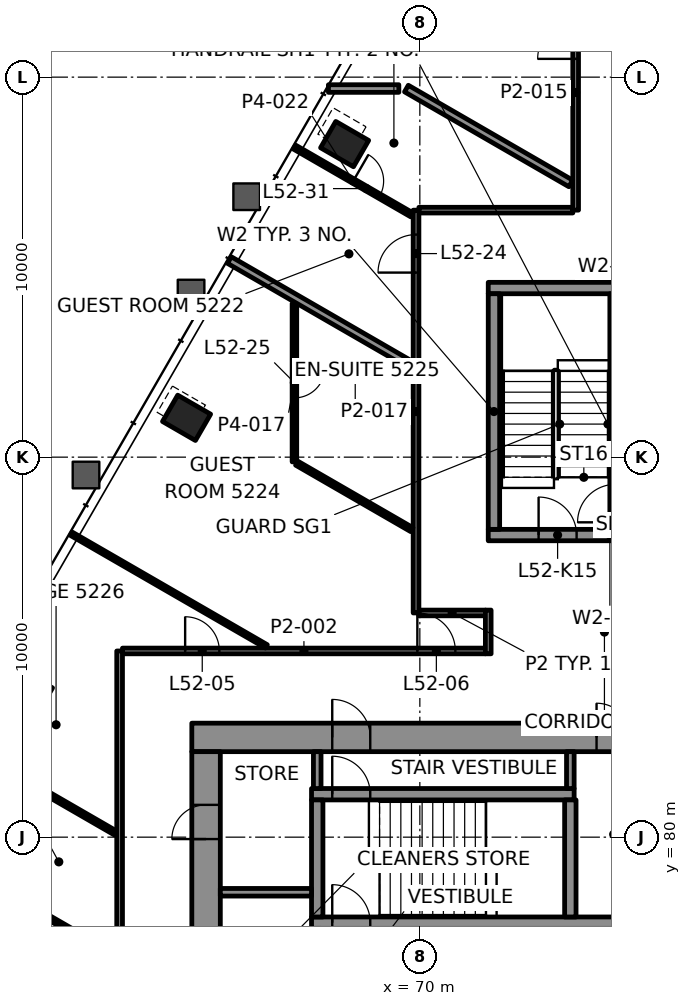
"""IFC4 building model, lengths in metres.
Left out: names, types, materials, properties, quantities, classifications, styles, units other than length and angle.
Written with IfcOpenShell. Run it as: python <this file> out.ifc"""

import sys

from ifc_helpers import new_model, si_unit, direction, frame, frame_2d, origin, origin_2d, place, context, subcontext, project, spatial, rectangle, hollow_rectangle, extrude, element, fill, save


model = new_model("IFC4")
c1 = context("Model", 3, precision=1e-05, world=origin(), true_north=direction((0.0, 1.0)))
c2 = subcontext(c1, "Body", "Model", "MODEL_VIEW")
j1 = project(units=[si_unit("LENGTHUNIT", "METRE"), si_unit("PLANEANGLEUNIT", "RADIAN")], contexts=[c1])
p1 = place(None, origin())
s1 = spatial("IfcSite", under=j1, at=p1, CompositionType="ELEMENT")
p2 = place(p1, origin())
s2 = spatial("IfcBuilding", under=s1, at=p2, CompositionType="ELEMENT")
p3 = place(p2, frame((0.0, 0.0, 222.1)))
s3 = spatial("IfcBuildingStorey", under=s2, at=p3, CompositionType="ELEMENT", Elevation=222.1)
for number, where, z_axis, x_axis in (
    (1, (68.021, 98.238, -0.0), (0.0, 0.0, 1.0), (-0.5, -0.866, 0.0)),
    (2, (63.862, 91.035, -0.0), (0.0, 0.0, 1.0), (-0.5, -0.866, 0.0)),
    (3, (59.703, 83.832, -0.0), (0.0, 0.0, 1.0), (-0.5, -0.866, 0.0)),
):
    element("IfcColumn", number, at=place(p3, frame(where, z_axis=z_axis, x_axis=x_axis)), inside=s3, PredefinedType="COLUMN", context=c2, shape_type="SweptSolid", body=[
        extrude(hollow_rectangle(XDim=0.8, YDim=1.0, WallThickness=0.05, at=origin_2d()), origin(), (0.0, 0.0, 1.0), 3.9),
    ])
p4 = place(p3, frame((64.0, 82.625, 0.0), z_axis=(0.0, 0.0, 1.0), x_axis=(1.0, 0.0, 0.0)))
e4 = element("IfcWall", 4, at=p4, inside=s3, PredefinedType="SHEAR", context=c2, shape_type="SweptSolid", body=[
    extrude(rectangle(XDim=22.0, YDim=0.75, at=frame_2d((11.0, 0.0))), origin(), (0.0, 0.0, 1.0), 3.7),
])
p5 = place(p4, frame((3.695, 0.0, 0.0)))
e5 = element("IfcOpeningElement", 5, at=p5, cuts=e4, PredefinedType="OPENING", context=c2, shape_type="SweptSolid", body=[
    extrude(rectangle(XDim=1.0, YDim=2.1, at=frame_2d((0.5, 1.05))), frame((0.0, 0.385, 0.0), z_axis=(0.0, -1.0, 0.0), x_axis=(1.0, 0.0, 0.0)), (0.0, 0.0, 1.0), 0.77),
])
p6 = place(p4, frame((17.505, 0.0, 0.0)))
e6 = element("IfcOpeningElement", 6, at=p6, cuts=e4, PredefinedType="OPENING", context=c2, shape_type="SweptSolid", body=[
    extrude(rectangle(XDim=1.0, YDim=2.1, at=frame_2d((0.5, 1.05))), frame((0.0, 0.385, 0.0), z_axis=(0.0, -1.0, 0.0), x_axis=(1.0, 0.0, 0.0)), (0.0, 0.0, 1.0), 0.77),
])
p7 = place(p4, frame((10.65, 0.0, 0.0)))
e7 = element("IfcOpeningElement", 7, at=p7, cuts=e4, PredefinedType="OPENING", context=c2, shape_type="SweptSolid", body=[
    extrude(rectangle(XDim=0.9, YDim=2.1, at=frame_2d((0.45, 1.05))), frame((0.0, 0.385, 0.0), z_axis=(0.0, -1.0, 0.0), x_axis=(1.0, 0.0, 0.0)), (0.0, 0.0, 1.0), 0.77),
])
p8 = place(p3, frame((64.375, 67.75, 0.0), z_axis=(0.0, 0.0, 1.0), x_axis=(0.0, 1.0, 0.0)))
e8 = element("IfcWall", 8, at=p8, inside=s3, PredefinedType="SHEAR", context=c2, shape_type="SweptSolid", body=[
    extrude(rectangle(XDim=14.5, YDim=0.75, at=frame_2d((7.25, 0.0))), origin(), (0.0, 0.0, 1.0), 3.7),
])
p9 = place(p8, frame((4.65, 0.0, 0.0)))
e9 = element("IfcOpeningElement", 9, at=p9, cuts=e8, PredefinedType="OPENING", context=c2, shape_type="SweptSolid", body=[
    extrude(rectangle(XDim=1.8, YDim=2.1, at=frame_2d((0.9, 1.05))), frame((0.0, 0.385, 0.0), z_axis=(0.0, -1.0, 0.0), x_axis=(1.0, 0.0, 0.0)), (0.0, 0.0, 1.0), 0.77),
])
p10 = place(p8, frame((8.5, 0.0, 0.0)))
e10 = element("IfcOpeningElement", 10, at=p10, cuts=e8, PredefinedType="OPENING", context=c2, shape_type="SweptSolid", body=[
    extrude(rectangle(XDim=0.9, YDim=2.1, at=frame_2d((0.45, 1.05))), frame((0.0, 0.385, 0.0), z_axis=(0.0, -1.0, 0.0), x_axis=(1.0, 0.0, 0.0)), (0.0, 0.0, 1.0), 0.77),
])
p11 = place(p8, frame((12.2, 0.0, 0.0)))
e11 = element("IfcOpeningElement", 11, at=p11, cuts=e8, PredefinedType="OPENING", context=c2, shape_type="SweptSolid", body=[
    extrude(rectangle(XDim=0.9, YDim=2.1, at=frame_2d((0.45, 1.05))), frame((0.0, 0.385, 0.0), z_axis=(0.0, -1.0, 0.0), x_axis=(1.0, 0.0, 0.0)), (0.0, 0.0, 1.0), 0.77),
])
p12 = place(p3, frame((67.15, 77.75, 0.0), z_axis=(0.0, 0.0, 1.0), x_axis=(1.0, 0.0, 0.0)))
e12 = element("IfcWall", 12, at=p12, inside=s3, PredefinedType="SHEAR", context=c2, shape_type="SweptSolid", body=[
    extrude(rectangle(XDim=17.45, YDim=0.3, at=frame_2d((8.725, 0.0))), origin(), (0.0, 0.0, 1.0), 3.7),
])
p13 = place(p12, frame((0.545, 0.0, 0.0)))
e13 = element("IfcOpeningElement", 13, at=p13, cuts=e12, PredefinedType="OPENING", context=c2, shape_type="SweptSolid", body=[
    extrude(rectangle(XDim=1.0, YDim=2.1, at=frame_2d((0.5, 1.05))), frame((0.0, 0.16, 0.0), z_axis=(0.0, -1.0, 0.0), x_axis=(1.0, 0.0, 0.0)), (0.0, 0.0, 1.0), 0.32),
])
p14 = place(p3, frame((67.15, 81.13, 0.0), z_axis=(0.0, 0.0, 1.0), x_axis=(1.0, 0.0, 0.0)))
e14 = element("IfcWall", 14, at=p14, inside=s3, PredefinedType="SHEAR", context=c2, shape_type="SweptSolid", body=[
    extrude(rectangle(XDim=6.91, YDim=0.3, at=frame_2d((3.455, 0.0))), origin(), (0.0, 0.0, 1.0), 3.7),
])
p15 = place(p14, frame((0.545, 0.0, 0.0)))
e15 = element("IfcOpeningElement", 15, at=p15, cuts=e14, PredefinedType="OPENING", context=c2, shape_type="SweptSolid", body=[
    extrude(rectangle(XDim=1.0, YDim=2.1, at=frame_2d((0.5, 1.05))), frame((0.0, 0.16, 0.0), z_axis=(0.0, -1.0, 0.0), x_axis=(1.0, 0.0, 0.0)), (0.0, 0.0, 1.0), 0.32),
])
for number, where, z_axis, x_axis in (
    (16, (67.3, 77.9, 0.0), (0.0, 0.0, 1.0), (0.0, 1.0, 0.0)),
    (17, (73.96, 77.9, 0.0), (0.0, 0.0, 1.0), (0.0, 1.0, 0.0)),
):
    element("IfcWall", number, at=place(p3, frame(where, z_axis=z_axis, x_axis=x_axis)), inside=s3, PredefinedType="SHEAR", context=c2, shape_type="SweptSolid", body=[
        extrude(rectangle(XDim=3.08, YDim=0.3, at=frame_2d((1.54, 0.0))), origin(), (0.0, 0.0, 1.0), 3.7),
    ])
p16 = place(p3, frame((71.8, 87.95, 0.0), z_axis=(0.0, 0.0, 1.0), x_axis=(1.0, 0.0, 0.0)))
e18 = element("IfcWall", 18, at=p16, inside=s3, PredefinedType="SHEAR", context=c2, shape_type="SweptSolid", body=[
    extrude(rectangle(XDim=6.4, YDim=0.3, at=frame_2d((3.2, 0.0))), origin(), (0.0, 0.0, 1.0), 3.7),
])
p17 = place(p16, frame((1.325, 0.0, 0.0)))
e19 = element("IfcOpeningElement", 19, at=p17, cuts=e18, PredefinedType="OPENING", context=c2, shape_type="SweptSolid", body=[
    extrude(rectangle(XDim=1.0, YDim=2.1, at=frame_2d((0.5, 1.05))), frame((0.0, 0.16, 0.0), z_axis=(0.0, -1.0, 0.0), x_axis=(1.0, 0.0, 0.0)), (0.0, 0.0, 1.0), 0.32),
])
p18 = place(p16, frame((4.125, 0.0, 0.0)))
e20 = element("IfcOpeningElement", 20, at=p18, cuts=e18, PredefinedType="OPENING", context=c2, shape_type="SweptSolid", body=[
    extrude(rectangle(XDim=1.2, YDim=2.1, at=frame_2d((0.6, 1.05))), frame((0.0, 0.16, 0.0), z_axis=(0.0, -1.0, 0.0), x_axis=(1.0, 0.0, 0.0)), (0.0, 0.0, 1.0), 0.32),
])
p19 = place(p3, frame((71.8, 94.45, 0.0), z_axis=(0.0, 0.0, 1.0), x_axis=(1.0, 0.0, 0.0)))
e21 = element("IfcWall", 21, at=p19, inside=s3, PredefinedType="SHEAR", context=c2, shape_type="SweptSolid", body=[
    extrude(rectangle(XDim=6.4, YDim=0.3, at=frame_2d((3.2, 0.0))), origin(), (0.0, 0.0, 1.0), 3.7),
])
p20 = place(p3, frame((71.95, 88.1, 0.0), z_axis=(0.0, 0.0, 1.0), x_axis=(0.0, 1.0, 0.0)))
e22 = element("IfcWall", 22, at=p20, inside=s3, PredefinedType="SHEAR", context=c2, shape_type="SweptSolid", body=[
    extrude(rectangle(XDim=6.2, YDim=0.3, at=frame_2d((3.1, 0.0))), origin(), (0.0, 0.0, 1.0), 3.7),
])
p21 = place(p3, frame((75.15, 88.1, 0.0), z_axis=(0.0, 0.0, 1.0), x_axis=(0.0, 1.0, 0.0)))
e23 = element("IfcWall", 23, at=p21, inside=s3, PredefinedType="SHEAR", context=c2, shape_type="SweptSolid", body=[
    extrude(rectangle(XDim=6.2, YDim=0.3, at=frame_2d((3.1, 0.0))), origin(), (0.0, 0.0, 1.0), 3.7),
])
p22 = place(p21, frame((0.185, 0.0, 0.0)))
e24 = element("IfcOpeningElement", 24, at=p22, cuts=e23, PredefinedType="OPENING", context=c2, shape_type="SweptSolid", body=[
    extrude(rectangle(XDim=1.0, YDim=2.1, at=frame_2d((0.5, 1.05))), frame((0.0, 0.16, 0.0), z_axis=(0.0, -1.0, 0.0), x_axis=(1.0, 0.0, 0.0)), (0.0, 0.0, 1.0), 0.32),
])
p23 = place(p3, frame((62.176, 84.9, 0.0), z_axis=(0.0, 0.0, 1.0), x_axis=(1.0, 0.0, 0.0)))
e25 = element("IfcWall", 25, at=p23, inside=s3, PredefinedType="PARTITIONING", context=c2, shape_type="SweptSolid", body=[
    extrude(rectangle(XDim=9.55, YDim=0.15, at=frame_2d((4.775, 0.0))), origin(), (0.0, 0.0, 1.0), 3.097),
])
p24 = place(p23, frame((1.649, 0.0, 0.0)))
e26 = element("IfcOpeningElement", 26, at=p24, cuts=e25, PredefinedType="OPENING", context=c2, shape_type="SweptSolid", body=[
    extrude(rectangle(XDim=0.9, YDim=2.1, at=frame_2d((0.45, 1.05))), frame((0.0, 0.085, 0.0), z_axis=(0.0, -1.0, 0.0), x_axis=(1.0, 0.0, 0.0)), (0.0, 0.0, 1.0), 0.17),
])
p25 = place(p23, frame((7.759, 0.0, 0.0)))
e27 = element("IfcOpeningElement", 27, at=p25, cuts=e25, PredefinedType="OPENING", context=c2, shape_type="SweptSolid", body=[
    extrude(rectangle(XDim=1.0, YDim=2.1, at=frame_2d((0.5, 1.05))), frame((0.0, 0.085, 0.0), z_axis=(0.0, -1.0, 0.0), x_axis=(1.0, 0.0, 0.0)), (0.0, 0.0, 1.0), 0.17),
])
p26 = place(p3, frame((69.976, 85.9, 0.0), z_axis=(0.0, 0.0, 1.0), x_axis=(1.0, 0.0, 0.0)))
e28 = element("IfcWall", 28, at=p26, inside=s3, PredefinedType="PARTITIONING", context=c2, shape_type="SweptSolid", body=[
    extrude(rectangle(XDim=1.75, YDim=0.15, at=frame_2d((0.875, 0.0))), origin(), (0.0, 0.0, 1.0), 3.1),
])
p27 = place(p3, frame((69.976, 96.5, 0.0), z_axis=(0.0, 0.0, 1.0), x_axis=(1.0, 0.0, 0.0)))
e29 = element("IfcWall", 29, at=p27, inside=s3, PredefinedType="PARTITIONING", context=c2, shape_type="SweptSolid", body=[
    extrude(rectangle(XDim=4.049, YDim=0.15, at=frame_2d((2.025, 0.0))), origin(), (0.0, 0.0, 1.0), 3.1),
])
p28 = place(p3, frame((67.594, 99.7, 0.0), z_axis=(0.0, 0.0, 1.0), x_axis=(1.0, 0.0, 0.0)))
e30 = element("IfcWall", 30, at=p28, inside=s3, PredefinedType="PARTITIONING", context=c2, shape_type="SweptSolid", body=[
    extrude(rectangle(XDim=1.853, YDim=0.2, at=frame_2d((0.927, 0.0))), origin(), (0.0, 0.0, 1.0), 3.1),
])
p29 = place(p3, frame((74.1, 96.5, 0.0), z_axis=(0.0, 0.0, 1.0), x_axis=(0.0, 1.0, 0.0)))
e31 = element("IfcWall", 31, at=p29, inside=s3, PredefinedType="PARTITIONING", context=c2, shape_type="SweptSolid", body=[
    extrude(rectangle(XDim=6.191, YDim=0.15, at=frame_2d((3.096, 0.0))), origin(), (0.0, 0.0, 1.0), 3.1),
])
p30 = place(p29, frame((3.981, 0.0, 0.0)))
e32 = element("IfcOpeningElement", 32, at=p30, cuts=e31, PredefinedType="OPENING", context=c2, shape_type="SweptSolid", body=[
    extrude(rectangle(XDim=1.0, YDim=2.1, at=frame_2d((0.5, 1.05))), frame((0.0, 0.085, 0.0), z_axis=(0.0, -1.0, 0.0), x_axis=(1.0, 0.0, 0.0)), (0.0, 0.0, 1.0), 0.17),
])
p31 = place(p3, frame((71.8, 84.825, 0.0), z_axis=(0.0, 0.0, 1.0), x_axis=(0.0, 1.0, 0.0)))
e33 = element("IfcWall", 33, at=p31, inside=s3, PredefinedType="PARTITIONING", context=c2, shape_type="SweptSolid", body=[
    extrude(rectangle(XDim=1.15, YDim=0.15, at=frame_2d((0.575, 0.0))), origin(), (0.0, 0.0, 1.0), 3.1),
])
p32 = place(p3, frame((69.9, 85.9, 0.0), z_axis=(0.0, 0.0, 1.0), x_axis=(0.0, 1.0, 0.0)))
e34 = element("IfcWall", 34, at=p32, inside=s3, PredefinedType="PARTITIONING", context=c2, shape_type="SweptSolid", body=[
    extrude(rectangle(XDim=10.599, YDim=0.15, at=frame_2d((5.3, 0.0))), origin(), (0.0, 0.0, 1.0), 3.1),
])
p33 = place(p32, frame((8.956, 0.0, 0.0)))
e35 = element("IfcOpeningElement", 35, at=p33, cuts=e34, PredefinedType="OPENING", context=c2, shape_type="SweptSolid", body=[
    extrude(rectangle(XDim=1.0, YDim=2.1, at=frame_2d((0.5, 1.05))), frame((0.0, 0.085, 0.0), z_axis=(0.0, -1.0, 0.0), x_axis=(1.0, 0.0, 0.0)), (0.0, 0.0, 1.0), 0.17),
])
p34 = place(p3, frame((66.7, 94.043, 0.0), z_axis=(0.0, 0.0, 1.0), x_axis=(0.0, -1.0, 0.0)))
e36 = element("IfcWall", 36, at=p34, inside=s3, PredefinedType="PARTITIONING", context=c2, shape_type="SweptSolid", body=[
    extrude(rectangle(XDim=4.167, YDim=0.12, at=frame_2d((2.083, 0.0))), origin(), (0.0, 0.0, 1.0), 3.1),
])
p35 = place(p34, frame((1.683, 0.0, 0.0)))
e37 = element("IfcOpeningElement", 37, at=p35, cuts=e36, PredefinedType="OPENING", context=c2, shape_type="SweptSolid", body=[
    extrude(rectangle(XDim=0.8, YDim=2.1, at=frame_2d((0.4, 1.05))), frame((0.0, 0.07, 0.0), z_axis=(0.0, -1.0, 0.0), x_axis=(1.0, 0.0, 0.0)), (0.0, 0.0, 1.0), 0.14),
])
p36 = place(p3, frame((62.1, 68.591, 0.0), z_axis=(0.0, 0.0, 1.0), x_axis=(0.0, 1.0, 0.0)))
e38 = element("IfcWall", 38, at=p36, inside=s3, PredefinedType="PARTITIONING", context=c2, shape_type="SweptSolid", body=[
    extrude(rectangle(XDim=16.308, YDim=0.15, at=frame_2d((8.154, 0.0))), origin(), (0.0, 0.0, 1.0), 3.1),
])
p37 = place(p36, frame((0.96, 0.0, 0.0)))
e39 = element("IfcOpeningElement", 39, at=p37, cuts=e38, PredefinedType="OPENING", context=c2, shape_type="SweptSolid", body=[
    extrude(rectangle(XDim=1.0, YDim=2.1, at=frame_2d((0.5, 1.05))), frame((0.0, 0.085, 0.0), z_axis=(0.0, -1.0, 0.0), x_axis=(1.0, 0.0, 0.0)), (0.0, 0.0, 1.0), 0.17),
])
p38 = place(p36, frame((6.772, 0.0, 0.0)))
e40 = element("IfcOpeningElement", 40, at=p38, cuts=e38, PredefinedType="OPENING", context=c2, shape_type="SweptSolid", body=[
    extrude(rectangle(XDim=1.0, YDim=2.1, at=frame_2d((0.5, 1.05))), frame((0.0, 0.085, 0.0), z_axis=(0.0, -1.0, 0.0), x_axis=(1.0, 0.0, 0.0)), (0.0, 0.0, 1.0), 0.17),
])
p39 = place(p3, frame((73.973, 97.202, 0.0), z_axis=(0.0, 0.0, 1.0), x_axis=(-0.866035818332, 0.499981961041, 0.0)))
e41 = element("IfcWall", 41, at=p39, inside=s3, PredefinedType="PARTITIONING", context=c2, shape_type="SweptSolid", body=[
    extrude(rectangle(XDim=4.995, YDim=0.2, at=frame_2d((2.498, 0.0))), origin(), (0.0, 0.0, 1.0), 3.1),
])
p40 = place(p3, frame((66.704, 98.158, 0.0), z_axis=(0.0, 0.0, 1.0), x_axis=(0.866021313335, -0.500007084799, 0.0)))
e42 = element("IfcWall", 42, at=p40, inside=s3, PredefinedType="PARTITIONING", context=c2, shape_type="SweptSolid", body=[
    extrude(rectangle(XDim=3.564, YDim=0.12, at=frame_2d((1.782, 0.0))), origin(), (0.0, 0.0, 1.0), 3.022),
])
p41 = place(p40, frame((1.782, 0.0, 0.0)))
e43 = element("IfcOpeningElement", 43, at=p41, cuts=e42, PredefinedType="OPENING", context=c2, shape_type="SweptSolid", body=[
    extrude(rectangle(XDim=0.8, YDim=2.1, at=frame_2d((0.4, 1.05))), frame((0.0, 0.07, 0.0), z_axis=(0.0, -1.0, 0.0), x_axis=(1.0, 0.0, 0.0)), (0.0, 0.0, 1.0), 0.14),
])
p42 = place(p3, frame((69.773, 92.424, 0.0), z_axis=(0.0, 0.0, 1.0), x_axis=(-0.866031780221, 0.499988955525, 0.0)))
e44 = element("IfcWall", 44, at=p42, inside=s3, PredefinedType="PARTITIONING", context=c2, shape_type="SweptSolid", body=[
    extrude(rectangle(XDim=5.524, YDim=0.2, at=frame_2d((2.762, 0.0))), origin(), (0.0, 0.0, 1.0), 3.022),
])
p43 = place(p3, frame((69.79, 88.092, 0.0), z_axis=(0.0, 0.0, 1.0), x_axis=(-0.866045006744, 0.49996604514, 0.0)))
e45 = element("IfcWall", 45, at=p43, inside=s3, PredefinedType="PARTITIONING", context=c2, shape_type="SweptSolid", body=[
    extrude(rectangle(XDim=3.499, YDim=0.12, at=frame_2d((1.75, 0.0))), origin(), (0.0, 0.0, 1.0), 3.1),
])
p44 = place(p3, frame((65.963, 85.02, 0.0), z_axis=(0.0, 0.0, 1.0), x_axis=(-0.866029186229, 0.499993448556, 0.0)))
e46 = element("IfcWall", 46, at=p44, inside=s3, PredefinedType="PARTITIONING", context=c2, shape_type="SweptSolid", body=[
    extrude(rectangle(XDim=5.927, YDim=0.1, at=frame_2d((2.963, 0.0))), origin(), (0.0, 0.0, 1.0), 3.022),
])
p45 = place(p3, frame((61.991, 80.11, 0.0), z_axis=(0.0, 0.0, 1.0), x_axis=(-0.866024338871, 0.500001844479, 0.0)))
e47 = element("IfcWall", 47, at=p45, inside=s3, PredefinedType="PARTITIONING", context=c2, shape_type="SweptSolid", body=[
    extrude(rectangle(XDim=4.942, YDim=0.12, at=frame_2d((2.471, 0.0))), origin(), (0.0, 0.0, 1.0), 3.022),
])
p46 = place(p3, frame((61.99, 76.868, 0.0), z_axis=(0.0, 0.0, 1.0), x_axis=(-0.866028357664, 0.499994883695, 0.0)))
e48 = element("IfcWall", 48, at=p46, inside=s3, PredefinedType="PARTITIONING", context=c2, shape_type="SweptSolid", body=[
    extrude(rectangle(XDim=3.568, YDim=0.12, at=frame_2d((1.784, 0.0))), origin(), (0.0, 0.0, 1.0), 3.1),
])
p47 = place(p3, frame((64.75, 78.55, 0.0), z_axis=(0.0, 0.0, 1.0), x_axis=(1.0, 0.0, 0.0)))
e49 = element("IfcWall", 49, at=p47, inside=s3, PredefinedType="PARTITIONING", context=c2, shape_type="SweptSolid", body=[
    extrude(rectangle(XDim=2.4, YDim=0.2, at=frame_2d((1.2, 0.0))), origin(), (0.0, 0.0, 1.0), 3.7),
])
for number, where, z_axis, x_axis in (
    (50, (67.3, 81.28, 0.0), (0.0, 0.0, 1.0), (0.0, 1.0, 0.0)),
    (51, (73.96, 81.28, 0.0), (0.0, 0.0, 1.0), (0.0, 1.0, 0.0)),
):
    element("IfcWall", number, at=place(p3, frame(where, z_axis=z_axis, x_axis=x_axis)), inside=s3, PredefinedType="PARTITIONING", context=c2, shape_type="SweptSolid", body=[
        extrude(rectangle(XDim=0.97, YDim=0.2, at=frame_2d((0.485, 0.0))), origin(), (0.0, 0.0, 1.0), 3.7),
    ])
p48 = place(p24, origin())
e52 = element("IfcDoor", 52, at=p48, inside=s3, OperationType="SINGLE_SWING_LEFT", PredefinedType="DOOR", context=c2, shape_type="SweptSolid", body=[
    extrude(rectangle(XDim=0.9, YDim=2.1, at=frame_2d((0.45, 1.05))), frame((0.0, 0.025, 0.0), z_axis=(0.0, -1.0, 0.0), x_axis=(1.0, 0.0, 0.0)), (0.0, 0.0, 1.0), 0.05),
])
fill(e26, e52)
p49 = place(p25, origin())
e53 = element("IfcDoor", 53, at=p49, inside=s3, OperationType="SINGLE_SWING_LEFT", PredefinedType="DOOR", context=c2, shape_type="SweptSolid", body=[
    extrude(rectangle(XDim=1.0, YDim=2.1, at=frame_2d((0.5, 1.05))), frame((0.0, 0.025, 0.0), z_axis=(0.0, -1.0, 0.0), x_axis=(1.0, 0.0, 0.0)), (0.0, 0.0, 1.0), 0.05),
])
fill(e27, e53)
p50 = place(p30, origin())
e54 = element("IfcDoor", 54, at=p50, inside=s3, OperationType="SINGLE_SWING_LEFT", PredefinedType="DOOR", context=c2, shape_type="SweptSolid", body=[
    extrude(rectangle(XDim=1.0, YDim=2.1, at=frame_2d((0.5, 1.05))), frame((0.0, 0.025, 0.0), z_axis=(0.0, -1.0, 0.0), x_axis=(1.0, 0.0, 0.0)), (0.0, 0.0, 1.0), 0.05),
])
fill(e32, e54)
p51 = place(p33, origin())
e55 = element("IfcDoor", 55, at=p51, inside=s3, OperationType="SINGLE_SWING_LEFT", PredefinedType="DOOR", context=c2, shape_type="SweptSolid", body=[
    extrude(rectangle(XDim=1.0, YDim=2.1, at=frame_2d((0.5, 1.05))), frame((0.0, 0.025, 0.0), z_axis=(0.0, -1.0, 0.0), x_axis=(1.0, 0.0, 0.0)), (0.0, 0.0, 1.0), 0.05),
])
fill(e35, e55)
p52 = place(p35, origin())
e56 = element("IfcDoor", 56, at=p52, inside=s3, OperationType="SINGLE_SWING_LEFT", PredefinedType="DOOR", context=c2, shape_type="SweptSolid", body=[
    extrude(rectangle(XDim=0.8, YDim=2.1, at=frame_2d((0.4, 1.05))), frame((0.0, 0.025, 0.0), z_axis=(0.0, -1.0, 0.0), x_axis=(1.0, 0.0, 0.0)), (0.0, 0.0, 1.0), 0.05),
])
fill(e37, e56)
p53 = place(p41, origin())
e57 = element("IfcDoor", 57, at=p53, inside=s3, OperationType="SINGLE_SWING_LEFT", PredefinedType="DOOR", context=c2, shape_type="SweptSolid", body=[
    extrude(rectangle(XDim=0.8, YDim=2.1, at=frame_2d((0.4, 1.05))), frame((0.0, 0.025, 0.0), z_axis=(0.0, -1.0, 0.0), x_axis=(1.0, 0.0, 0.0)), (0.0, 0.0, 1.0), 0.05),
])
fill(e43, e57)
p54 = place(p13, origin())
e58 = element("IfcDoor", 58, at=p54, inside=s3, OperationType="SINGLE_SWING_LEFT", PredefinedType="DOOR", context=c2, shape_type="SweptSolid", body=[
    extrude(rectangle(XDim=1.0, YDim=2.1, at=frame_2d((0.5, 1.05))), frame((0.0, 0.025, 0.0), z_axis=(0.0, -1.0, 0.0), x_axis=(1.0, 0.0, 0.0)), (0.0, 0.0, 1.0), 0.05),
])
fill(e13, e58)
p55 = place(p15, origin())
e59 = element("IfcDoor", 59, at=p55, inside=s3, OperationType="SINGLE_SWING_RIGHT", PredefinedType="DOOR", context=c2, shape_type="SweptSolid", body=[
    extrude(rectangle(XDim=1.0, YDim=2.1, at=frame_2d((0.5, 1.05))), frame((0.0, 0.025, 0.0), z_axis=(0.0, -1.0, 0.0), x_axis=(1.0, 0.0, 0.0)), (0.0, 0.0, 1.0), 0.05),
])
fill(e15, e59)
p56 = place(p5, origin())
e60 = element("IfcDoor", 60, at=p56, inside=s3, OperationType="SINGLE_SWING_LEFT", PredefinedType="DOOR", context=c2, shape_type="SweptSolid", body=[
    extrude(rectangle(XDim=1.0, YDim=2.1, at=frame_2d((0.5, 1.05))), frame((0.0, 0.095, 0.0), z_axis=(0.0, -1.0, 0.0), x_axis=(1.0, 0.0, 0.0)), (0.0, 0.0, 1.0), 0.19),
])
fill(e5, e60)
p57 = place(p17, origin())
e61 = element("IfcDoor", 61, at=p57, inside=s3, OperationType="SINGLE_SWING_RIGHT", PredefinedType="DOOR", context=c2, shape_type="SweptSolid", body=[
    extrude(rectangle(XDim=1.0, YDim=2.1, at=frame_2d((0.5, 1.05))), frame((0.0, 0.025, 0.0), z_axis=(0.0, -1.0, 0.0), x_axis=(1.0, 0.0, 0.0)), (0.0, 0.0, 1.0), 0.05),
])
fill(e19, e61)
p58 = place(p11, origin())
e62 = element("IfcDoor", 62, at=p58, inside=s3, OperationType="SINGLE_SWING_LEFT", PredefinedType="DOOR", context=c2, shape_type="SweptSolid", body=[
    extrude(rectangle(XDim=0.9, YDim=2.1, at=frame_2d((0.45, 1.05))), frame((0.0, 0.095, 0.0), z_axis=(0.0, -1.0, 0.0), x_axis=(1.0, 0.0, 0.0)), (0.0, 0.0, 1.0), 0.19),
])
fill(e11, e62)
p59 = place(p7, origin())
e63 = element("IfcDoor", 63, at=p59, inside=s3, OperationType="SINGLE_SWING_RIGHT", PredefinedType="DOOR", context=c2, shape_type="SweptSolid", body=[
    extrude(rectangle(XDim=0.9, YDim=2.1, at=frame_2d((0.45, 1.05))), frame((0.0, 0.095, 0.0), z_axis=(0.0, -1.0, 0.0), x_axis=(1.0, 0.0, 0.0)), (0.0, 0.0, 1.0), 0.19),
])
fill(e7, e63)
save(model, sys.argv[1])
